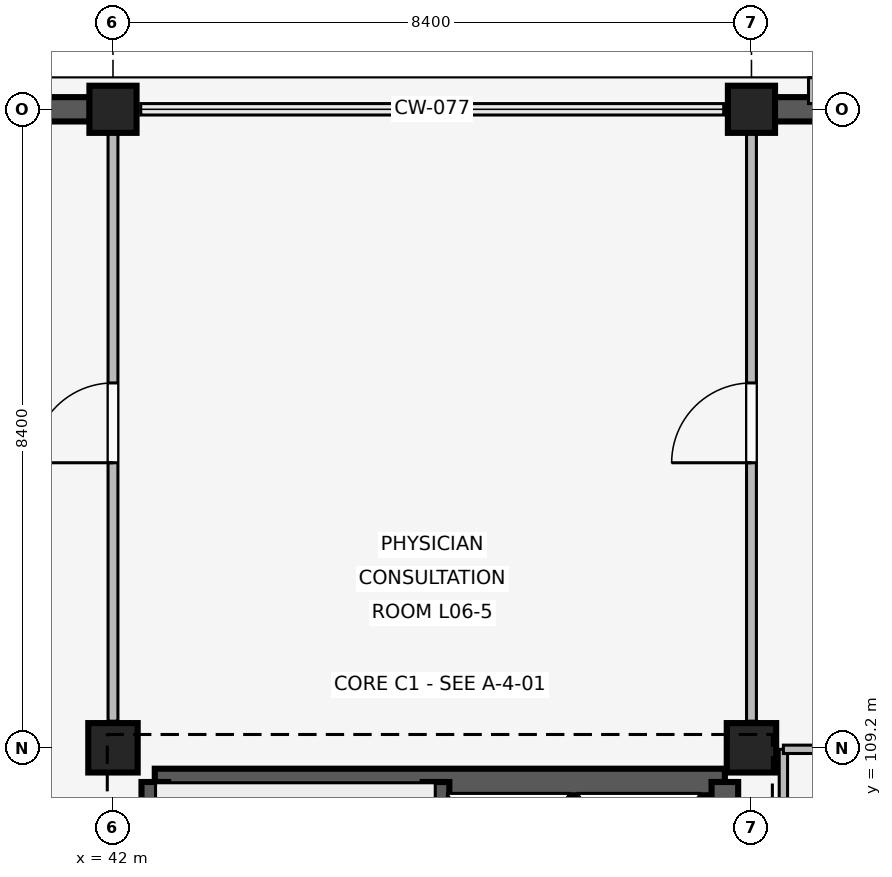
"""IFC4 building model, lengths in metres.
Left out: names, types, materials, properties, quantities, classifications, styles, units other than length and angle.
Written with IfcOpenShell. Run it as: python <this file> out.ifc"""

import sys

from ifc_helpers import new_model, si_unit, direction, frame, frame_2d, origin, origin_2d, place, context, subcontext, project, spatial, rectangle, extrude, element, fill, save


model = new_model("IFC4")
c1 = context("Model", 3, precision=1e-05, world=origin(), true_north=direction((0.0, 1.0)))
c2 = subcontext(c1, "Body", "Model", "MODEL_VIEW")
j1 = project(units=[si_unit("LENGTHUNIT", "METRE"), si_unit("PLANEANGLEUNIT", "RADIAN")], contexts=[c1])
p1 = place(None, origin())
s1 = spatial("IfcSite", under=j1, at=p1, CompositionType="ELEMENT")
p2 = place(p1, origin())
s2 = spatial("IfcBuilding", under=s1, at=p2, CompositionType="ELEMENT")
p3 = place(p2, frame((0.0, 0.0, 24.6)))
s3 = spatial("IfcBuildingStorey", under=s2, at=p3, CompositionType="ELEMENT", Elevation=24.6)
p4 = place(p3, frame((42.0, 109.2, 0.0), z_axis=(0.0, 0.0, 1.0), x_axis=(1.0, 0.0, 0.0)))
e1 = element("IfcColumn", 1, at=p4, inside=s3, PredefinedType="COLUMN", context=c2, shape_type="SweptSolid", body=[
    extrude(rectangle(XDim=0.65, YDim=0.65, at=origin_2d()), origin(), (0.0, 0.0, 1.0), 4.2),
])
p5 = place(p3, frame((42.0, 117.6, 0.0), z_axis=(0.0, 0.0, 1.0), x_axis=(1.0, 0.0, 0.0)))
e2 = element("IfcColumn", 2, at=p5, inside=s3, PredefinedType="COLUMN", context=c2, shape_type="SweptSolid", body=[
    extrude(rectangle(XDim=0.62, YDim=0.62, at=origin_2d()), origin(), (0.0, 0.0, 1.0), 4.2),
])
p6 = place(p3, frame((50.4, 109.2, 0.0), z_axis=(0.0, 0.0, 1.0), x_axis=(1.0, 0.0, 0.0)))
e3 = element("IfcColumn", 3, at=p6, inside=s3, PredefinedType="COLUMN", context=c2, shape_type="SweptSolid", body=[
    extrude(rectangle(XDim=0.65, YDim=0.65, at=origin_2d()), origin(), (0.0, 0.0, 1.0), 4.2),
])
p7 = place(p3, frame((50.4, 117.6, 0.0), z_axis=(0.0, 0.0, 1.0), x_axis=(1.0, 0.0, 0.0)))
e4 = element("IfcColumn", 4, at=p7, inside=s3, PredefinedType="COLUMN", context=c2, shape_type="SweptSolid", body=[
    extrude(rectangle(XDim=0.62, YDim=0.62, at=origin_2d()), origin(), (0.0, 0.0, 1.0), 4.2),
])
p8 = place(p3, frame((33.905, 117.6, 0.0), z_axis=(0.0, 0.0, 1.0), x_axis=(1.0, 0.0, 0.0)))
e5 = element("IfcWall", 5, at=p8, inside=s3, PredefinedType="SOLIDWALL", context=c2, shape_type="SweptSolid", body=[
    extrude(rectangle(XDim=7.79, YDim=0.32, at=frame_2d((3.895, 0.0))), origin(), (0.0, 0.0, 1.0), 3.34),
])
p9 = place(p8, frame((1.242, 0.0, 0.85)))
e6 = element("IfcOpeningElement", 6, at=p9, cuts=e5, PredefinedType="OPENING", context=c2, shape_type="SweptSolid", body=[
    extrude(rectangle(XDim=1.1, YDim=1.6, at=frame_2d((0.55, 0.8))), frame((0.0, 0.17, 0.0), z_axis=(0.0, -1.0, 0.0), x_axis=(1.0, 0.0, 0.0)), (0.0, 0.0, 1.0), 0.34),
])
p10 = place(p8, frame((5.448, 0.0, 0.85)))
e7 = element("IfcOpeningElement", 7, at=p10, cuts=e5, PredefinedType="OPENING", context=c2, shape_type="SweptSolid", body=[
    extrude(rectangle(XDim=1.1, YDim=1.6, at=frame_2d((0.55, 0.8))), frame((0.0, 0.17, 0.0), z_axis=(0.0, -1.0, 0.0), x_axis=(1.0, 0.0, 0.0)), (0.0, 0.0, 1.0), 0.34),
])
p11 = place(p3, frame((50.705, 117.6, 0.0), z_axis=(0.0, 0.0, 1.0), x_axis=(1.0, 0.0, 0.0)))
e8 = element("IfcWall", 8, at=p11, inside=s3, PredefinedType="SOLIDWALL", context=c2, shape_type="SweptSolid", body=[
    extrude(rectangle(XDim=7.79, YDim=0.32, at=frame_2d((3.895, 0.0))), origin(), (0.0, 0.0, 1.0), 3.34),
])
p12 = place(p11, frame((1.002, 0.0, 0.85)))
e9 = element("IfcOpeningElement", 9, at=p12, cuts=e8, PredefinedType="OPENING", context=c2, shape_type="SweptSolid", body=[
    extrude(rectangle(XDim=1.58, YDim=1.7, at=frame_2d((0.79, 0.85))), frame((0.0, 0.17, 0.0), z_axis=(0.0, -1.0, 0.0), x_axis=(1.0, 0.0, 0.0)), (0.0, 0.0, 1.0), 0.34),
])
p13 = place(p11, frame((5.208, 0.0, 0.85)))
e10 = element("IfcOpeningElement", 10, at=p13, cuts=e8, PredefinedType="OPENING", context=c2, shape_type="SweptSolid", body=[
    extrude(rectangle(XDim=1.58, YDim=1.7, at=frame_2d((0.79, 0.85))), frame((0.0, 0.17, 0.0), z_axis=(0.0, -1.0, 0.0), x_axis=(1.0, 0.0, 0.0)), (0.0, 0.0, 1.0), 0.34),
])
p14 = place(p3, frame((51.25, 117.675, 0.0), z_axis=(0.0, 0.0, 1.0), x_axis=(0.0, 1.0, 0.0)))
e11 = element("IfcWall", 11, at=p14, inside=s3, PredefinedType="ELEMENTEDWALL", context=c2, shape_type="SweptSolid", body=[
    extrude(rectangle(XDim=0.34, YDim=0.2, at=frame_2d((0.17, 0.0))), origin(), (0.0, 0.0, 1.0), 3.32),
])
p15 = place(p3, frame((42.55, 108.75, 0.0), z_axis=(0.0, 0.0, 1.0), x_axis=(1.0, 0.0, 0.0)))
e12 = element("IfcWall", 12, at=p15, inside=s3, PredefinedType="SHEAR", context=c2, shape_type="SweptSolid", body=[
    extrude(rectangle(XDim=7.5, YDim=0.35, at=frame_2d((3.75, 0.0))), origin(), (0.0, 0.0, 1.0), 3.92),
])
p16 = place(p3, frame((42.55, 101.2, 0.0), z_axis=(0.0, 0.0, 1.0), x_axis=(0.0, 1.0, 0.0)))
e13 = element("IfcWall", 13, at=p16, inside=s3, PredefinedType="SHEAR", context=c2, shape_type="SweptSolid", body=[
    extrude(rectangle(XDim=7.55, YDim=0.35, at=frame_2d((3.775, 0.0))), origin(), (0.0, 0.0, 1.0), 3.92),
])
p17 = place(p16, frame((0.28, 0.0, 0.0)))
e14 = element("IfcOpeningElement", 14, at=p17, cuts=e13, PredefinedType="OPENING", context=c2, shape_type="SweptSolid", body=[
    extrude(rectangle(XDim=1.0, YDim=2.15, at=frame_2d((0.5, 1.075))), frame((0.0, 0.185, 0.0), z_axis=(0.0, -1.0, 0.0), x_axis=(1.0, 0.0, 0.0)), (0.0, 0.0, 1.0), 0.37),
])
p18 = place(p3, frame((50.05, 101.2, 0.0), z_axis=(0.0, 0.0, 1.0), x_axis=(0.0, 1.0, 0.0)))
e15 = element("IfcWall", 15, at=p18, inside=s3, PredefinedType="SHEAR", context=c2, shape_type="SweptSolid", body=[
    extrude(rectangle(XDim=7.55, YDim=0.35, at=frame_2d((3.775, 0.0))), origin(), (0.0, 0.0, 1.0), 3.92),
])
p19 = place(p18, frame((2.4, 0.0, 0.0)))
e16 = element("IfcOpeningElement", 16, at=p19, cuts=e15, PredefinedType="OPENING", context=c2, shape_type="SweptSolid", body=[
    extrude(rectangle(XDim=1.2, YDim=2.2, at=frame_2d((0.6, 1.1))), frame((0.0, 0.185, 0.0), z_axis=(0.0, -1.0, 0.0), x_axis=(1.0, 0.0, 0.0)), (0.0, 0.0, 1.0), 0.37),
])
p20 = place(p3, frame((46.25, 101.2, 0.0), z_axis=(0.0, 0.0, 1.0), x_axis=(0.0, 1.0, 0.0)))
e17 = element("IfcWall", 17, at=p20, inside=s3, PredefinedType="SHEAR", context=c2, shape_type="SweptSolid", body=[
    extrude(rectangle(XDim=7.55, YDim=0.35, at=frame_2d((3.775, 0.0))), origin(), (0.0, 0.0, 1.0), 3.92),
])
p21 = place(p20, frame((0.28, 0.0, 0.0)))
e18 = element("IfcOpeningElement", 18, at=p21, cuts=e17, PredefinedType="OPENING", context=c2, shape_type="SweptSolid", body=[
    extrude(rectangle(XDim=1.0, YDim=2.15, at=frame_2d((0.5, 1.075))), frame((0.0, 0.185, 0.0), z_axis=(0.0, -1.0, 0.0), x_axis=(1.0, 0.0, 0.0)), (0.0, 0.0, 1.0), 0.37),
])
p22 = place(p3, frame((42.0, 109.55, 0.0), z_axis=(0.0, 0.0, 1.0), x_axis=(0.0, 1.0, 0.0)))
e19 = element("IfcWall", 19, at=p22, inside=s3, PredefinedType="PARTITIONING", context=c2, shape_type="SweptSolid", body=[
    extrude(rectangle(XDim=7.91, YDim=0.13, at=frame_2d((3.955, 0.0))), origin(), (0.0, 0.0, 1.0), 3.32),
])
p23 = place(p22, frame((3.4, 0.0, 0.0)))
e20 = element("IfcOpeningElement", 20, at=p23, cuts=e19, PredefinedType="OPENING", context=c2, shape_type="SweptSolid", body=[
    extrude(rectangle(XDim=1.05, YDim=2.2, at=frame_2d((0.525, 1.1))), frame((0.0, 0.075, 0.0), z_axis=(0.0, -1.0, 0.0), x_axis=(1.0, 0.0, 0.0)), (0.0, 0.0, 1.0), 0.15),
])
p24 = place(p3, frame((50.4, 109.55, 0.0), z_axis=(0.0, 0.0, 1.0), x_axis=(0.0, 1.0, 0.0)))
e21 = element("IfcWall", 21, at=p24, inside=s3, PredefinedType="PARTITIONING", context=c2, shape_type="SweptSolid", body=[
    extrude(rectangle(XDim=7.91, YDim=0.13, at=frame_2d((3.955, 0.0))), origin(), (0.0, 0.0, 1.0), 3.32),
])
p25 = place(p24, frame((3.4, 0.0, 0.0)))
e22 = element("IfcOpeningElement", 22, at=p25, cuts=e21, PredefinedType="OPENING", context=c2, shape_type="SweptSolid", body=[
    extrude(rectangle(XDim=1.05, YDim=2.2, at=frame_2d((0.525, 1.1))), frame((0.0, 0.075, 0.0), z_axis=(0.0, -1.0, 0.0), x_axis=(1.0, 0.0, 0.0)), (0.0, 0.0, 1.0), 0.15),
])
p26 = place(p3, frame((50.82, 106.57, 0.0), z_axis=(0.0, 0.0, 1.0), x_axis=(0.0, 1.0, 0.0)))
e23 = element("IfcWall", 23, at=p26, inside=s3, PredefinedType="PARTITIONING", context=c2, shape_type="SweptSolid", body=[
    extrude(rectangle(XDim=2.61, YDim=0.11, at=frame_2d((1.305, 0.0))), origin(), (0.0, 0.0, 1.0), 3.32),
])
p27 = place(p3, frame((50.82, 109.18, 0.0), z_axis=(0.0, 0.0, 1.0), x_axis=(1.0, 0.0, 0.0)))
e24 = element("IfcWall", 24, at=p27, inside=s3, PredefinedType="PARTITIONING", context=c2, shape_type="SweptSolid", body=[
    extrude(rectangle(XDim=1.98, YDim=0.11, at=frame_2d((0.99, 0.0))), origin(), (0.0, 0.0, 1.0), 3.32),
])
p28 = place(p27, frame((0.54, 0.0, 0.0)))
e25 = element("IfcOpeningElement", 25, at=p28, cuts=e24, PredefinedType="OPENING", context=c2, shape_type="SweptSolid", body=[
    extrude(rectangle(XDim=0.9, YDim=2.1, at=frame_2d((0.45, 1.05))), frame((0.0, 0.065, 0.0), z_axis=(0.0, -1.0, 0.0), x_axis=(1.0, 0.0, 0.0)), (0.0, 0.0, 1.0), 0.13),
])
p29 = place(p23, origin())
e26 = element("IfcDoor", 26, at=p29, inside=s3, OperationType="SINGLE_SWING_LEFT", PredefinedType="DOOR", context=c2, shape_type="SweptSolid", body=[
    extrude(rectangle(XDim=1.05, YDim=2.2, at=frame_2d((0.525, 1.1))), frame((0.0, 0.025, 0.0), z_axis=(0.0, -1.0, 0.0), x_axis=(1.0, 0.0, 0.0)), (0.0, 0.0, 1.0), 0.05),
])
fill(e20, e26)
p30 = place(p25, origin())
e27 = element("IfcDoor", 27, at=p30, inside=s3, OperationType="SINGLE_SWING_LEFT", PredefinedType="DOOR", context=c2, shape_type="SweptSolid", body=[
    extrude(rectangle(XDim=1.05, YDim=2.2, at=frame_2d((0.525, 1.1))), frame((0.0, 0.025, 0.0), z_axis=(0.0, -1.0, 0.0), x_axis=(1.0, 0.0, 0.0)), (0.0, 0.0, 1.0), 0.05),
])
fill(e22, e27)
save(model, sys.argv[1])
